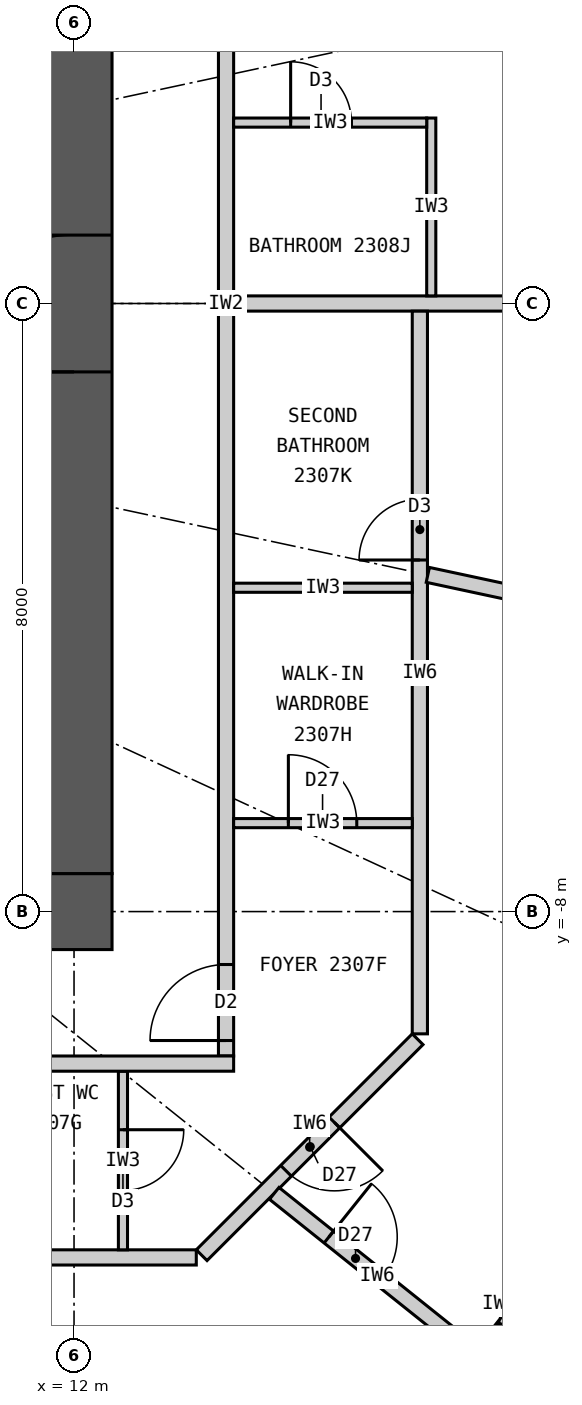
"""IFC4 building model, lengths in metres.
Left out: names, types, materials, properties, quantities, classifications, styles, units other than length and angle.
Written with IfcOpenShell. Run it as: python <this file> out.ifc"""

import sys

from ifc_helpers import new_model, si_unit, direction, frame, frame_2d, origin, place, context, subcontext, project, spatial, rectangle, extrude, element, fill, save


model = new_model("IFC4")
c1 = context("Model", 3, precision=1e-05, world=origin(), true_north=direction((0.0, 1.0)))
c2 = subcontext(c1, "Body", "Model", "MODEL_VIEW")
j1 = project(units=[si_unit("LENGTHUNIT", "METRE"), si_unit("PLANEANGLEUNIT", "RADIAN")], contexts=[c1])
p1 = place(None, origin())
s1 = spatial("IfcSite", under=j1, at=p1, CompositionType="ELEMENT")
p2 = place(p1, origin())
s2 = spatial("IfcBuilding", under=s1, at=p2, CompositionType="ELEMENT")
p3 = place(p2, frame((0.0, 0.0, 90.3)))
s3 = spatial("IfcBuildingStorey", under=s2, at=p3, CompositionType="ELEMENT", Elevation=90.3)
p4 = place(p3, frame((12.5, -8.0, 0.0), z_axis=(0.0, 0.0, 1.0), x_axis=(-1.0, 0.0, 0.0)))
e1 = element("IfcWall", 1, at=p4, inside=s3, PredefinedType="SHEAR", context=c2, shape_type="SweptSolid", body=[
    extrude(rectangle(XDim=25.0, YDim=1.0, at=frame_2d((12.5, 0.0))), origin(), (0.0, 0.0, 1.0), 3.3),
])
p5 = place(p4, frame((11.2, 0.0, 0.0)))
e2 = element("IfcOpeningElement", 2, at=p5, cuts=e1, PredefinedType="OPENING", context=c2, shape_type="SweptSolid", body=[
    extrude(rectangle(XDim=1.2, YDim=2.2, at=frame_2d((0.6, 1.1))), frame((0.0, 0.51, 0.0), z_axis=(0.0, -1.0, 0.0), x_axis=(1.0, 0.0, 0.0)), (0.0, 0.0, 1.0), 1.02),
])
p6 = place(p4, frame((18.8, 0.0, 0.0)))
e3 = element("IfcOpeningElement", 3, at=p6, cuts=e1, PredefinedType="OPENING", context=c2, shape_type="SweptSolid", body=[
    extrude(rectangle(XDim=0.9, YDim=2.2, at=frame_2d((0.45, 1.1))), frame((0.0, 0.51, 0.0), z_axis=(0.0, -1.0, 0.0), x_axis=(1.0, 0.0, 0.0)), (0.0, 0.0, 1.0), 1.02),
])
p7 = place(p3, frame((12.0, -7.5, 0.0), z_axis=(0.0, 0.0, 1.0), x_axis=(0.0, 1.0, 0.0)))
e4 = element("IfcWall", 4, at=p7, inside=s3, PredefinedType="SHEAR", context=c2, shape_type="SweptSolid", body=[
    extrude(rectangle(XDim=15.0, YDim=1.0, at=frame_2d((7.5, 0.0))), origin(), (0.0, 0.0, 1.0), 3.3),
])
p8 = place(p7, frame((6.6, 0.0, 0.0)))
e5 = element("IfcOpeningElement", 5, at=p8, cuts=e4, PredefinedType="OPENING", context=c2, shape_type="SweptSolid", body=[
    extrude(rectangle(XDim=1.8, YDim=2.2, at=frame_2d((0.9, 1.1))), frame((0.0, 0.51, 0.0), z_axis=(0.0, -1.0, 0.0), x_axis=(1.0, 0.0, 0.0)), (0.0, 0.0, 1.0), 1.02),
])
p9 = place(p3, frame((14.0, -9.9, 0.0), z_axis=(0.0, 0.0, 1.0), x_axis=(0.0, 1.0, 0.0)))
e6 = element("IfcWall", 6, at=p9, inside=s3, PredefinedType="PARTITIONING", context=c2, shape_type="SweptSolid", body=[
    extrude(rectangle(XDim=19.8, YDim=0.2, at=frame_2d((9.9, 0.0))), origin(), (0.0, 0.0, 1.0), 3.05),
])
p10 = place(p9, frame((0.204, 0.0, 0.0)))
e7 = element("IfcOpeningElement", 7, at=p10, cuts=e6, PredefinedType="OPENING", context=c2, shape_type="SweptSolid", body=[
    extrude(rectangle(XDim=1.0, YDim=2.2, at=frame_2d((0.5, 1.1))), frame((0.0, 0.11, 0.0), z_axis=(0.0, -1.0, 0.0), x_axis=(1.0, 0.0, 0.0)), (0.0, 0.0, 1.0), 0.22),
])
p11 = place(p9, frame((13.715, 0.0, 0.0)))
e8 = element("IfcOpeningElement", 8, at=p11, cuts=e6, PredefinedType="OPENING", context=c2, shape_type="SweptSolid", body=[
    extrude(rectangle(XDim=1.0, YDim=2.2, at=frame_2d((0.5, 1.1))), frame((0.0, 0.11, 0.0), z_axis=(0.0, -1.0, 0.0), x_axis=(1.0, 0.0, 0.0)), (0.0, 0.0, 1.0), 0.22),
])
p12 = place(p9, frame((18.698, 0.0, 0.0)))
e9 = element("IfcOpeningElement", 9, at=p12, cuts=e6, PredefinedType="OPENING", context=c2, shape_type="SweptSolid", body=[
    extrude(rectangle(XDim=1.0, YDim=2.2, at=frame_2d((0.5, 1.1))), frame((0.0, 0.11, 0.0), z_axis=(0.0, -1.0, 0.0), x_axis=(1.0, 0.0, 0.0)), (0.0, 0.0, 1.0), 0.22),
])
p13 = place(p3, frame((14.1, 0.0, 0.0), z_axis=(0.0, 0.0, 1.0), x_axis=(1.0, 0.0, 0.0)))
e10 = element("IfcWall", 10, at=p13, inside=s3, PredefinedType="PARTITIONING", context=c2, shape_type="SweptSolid", body=[
    extrude(rectangle(XDim=10.75, YDim=0.2, at=frame_2d((5.375, 0.0))), origin(), (0.0, 0.0, 1.0), 2.25),
])
p14 = place(p3, frame((7.289, -10.1, 0.0), z_axis=(0.0, 0.0, 1.0), x_axis=(0.585198353053, -0.810890182197, 0.0)))
e11 = element("IfcWall", 11, at=p14, inside=s3, PredefinedType="PARTITIONING", context=c2, shape_type="SweptSolid", body=[
    extrude(rectangle(XDim=8.36, YDim=0.2, at=frame_2d((4.18, 0.0))), origin(), (0.0, 0.0, 1.0), 2.15),
])
p15 = place(p3, frame((9.232, -12.55, 0.0), z_axis=(0.0, 0.0, 1.0), x_axis=(1.0, 0.0, 0.0)))
e12 = element("IfcWall", 12, at=p15, inside=s3, PredefinedType="PARTITIONING", context=c2, shape_type="SweptSolid", body=[
    extrude(rectangle(XDim=4.377, YDim=0.2, at=frame_2d((2.188, 0.0))), origin(), (0.0, 0.0, 1.0), 3.05),
])
p16 = place(p15, frame((0.685, 0.0, 0.0)))
e13 = element("IfcOpeningElement", 13, at=p16, cuts=e12, PredefinedType="OPENING", context=c2, shape_type="SweptSolid", body=[
    extrude(rectangle(XDim=0.8, YDim=2.1, at=frame_2d((0.4, 1.05))), frame((0.0, 0.11, 0.0), z_axis=(0.0, -1.0, 0.0), x_axis=(1.0, 0.0, 0.0)), (0.0, 0.0, 1.0), 0.22),
])
p17 = place(p3, frame((13.679, -12.521, 0.0), z_axis=(0.0, 0.0, 1.0), x_axis=(0.707106781187, 0.707106781187, 0.0)))
e14 = element("IfcWall", 14, at=p17, inside=s3, PredefinedType="PARTITIONING", context=c2, shape_type="SweptSolid", body=[
    extrude(rectangle(XDim=4.019, YDim=0.2, at=frame_2d((2.009, 0.0))), origin(), (0.0, 0.0, 1.0), 3.05),
])
p18 = place(p17, frame((1.57, 0.0, 0.0)))
e15 = element("IfcOpeningElement", 15, at=p18, cuts=e14, PredefinedType="OPENING", context=c2, shape_type="SweptSolid", body=[
    extrude(rectangle(XDim=0.9, YDim=2.1, at=frame_2d((0.45, 1.05))), frame((0.0, 0.11, 0.0), z_axis=(0.0, -1.0, 0.0), x_axis=(1.0, 0.0, 0.0)), (0.0, 0.0, 1.0), 0.22),
])
p19 = place(p3, frame((16.55, -9.609, 0.0), z_axis=(0.0, 0.0, 1.0), x_axis=(0.0, 1.0, 0.0)))
e16 = element("IfcWall", 16, at=p19, inside=s3, PredefinedType="PARTITIONING", context=c2, shape_type="SweptSolid", body=[
    extrude(rectangle(XDim=9.508, YDim=0.2, at=frame_2d((4.754, 0.0))), origin(), (0.0, 0.0, 1.0), 3.05),
])
p20 = place(p19, frame((6.234, 0.0, 0.0)))
e17 = element("IfcOpeningElement", 17, at=p20, cuts=e16, PredefinedType="OPENING", context=c2, shape_type="SweptSolid", body=[
    extrude(rectangle(XDim=0.8, YDim=2.1, at=frame_2d((0.4, 1.05))), frame((0.0, 0.11, 0.0), z_axis=(0.0, -1.0, 0.0), x_axis=(1.0, 0.0, 0.0)), (0.0, 0.0, 1.0), 0.22),
])
p21 = place(p3, frame((14.634, -11.707, 0.0), z_axis=(0.0, 0.0, 1.0), x_axis=(0.780903110683, -0.624652168591, 0.0)))
e18 = element("IfcWall", 18, at=p21, inside=s3, PredefinedType="PARTITIONING", context=c2, shape_type="SweptSolid", body=[
    extrude(rectangle(XDim=3.472, YDim=0.2, at=frame_2d((1.736, 0.0))), origin(), (0.0, 0.0, 1.0), 2.25),
])
p22 = place(p21, frame((0.92, 0.0, 0.0)))
e19 = element("IfcOpeningElement", 19, at=p22, cuts=e18, PredefinedType="OPENING", context=c2, shape_type="SweptSolid", body=[
    extrude(rectangle(XDim=0.9, YDim=2.1, at=frame_2d((0.45, 1.05))), frame((0.0, 0.11, 0.0), z_axis=(0.0, -1.0, 0.0), x_axis=(1.0, 0.0, 0.0)), (0.0, 0.0, 1.0), 0.22),
])
p23 = place(p3, frame((16.655, -3.57, 0.0), z_axis=(0.0, 0.0, 1.0), x_axis=(0.977788045219, -0.209596132183, 0.0)))
e20 = element("IfcWall", 20, at=p23, inside=s3, PredefinedType="PARTITIONING", context=c2, shape_type="SweptSolid", body=[
    extrude(rectangle(XDim=3.482, YDim=0.2, at=frame_2d((1.741, 0.0))), origin(), (0.0, 0.0, 1.0), 3.05),
])
p24 = place(p23, frame((1.621, 0.0, 0.0)))
e21 = element("IfcOpeningElement", 21, at=p24, cuts=e20, PredefinedType="OPENING", context=c2, shape_type="SweptSolid", body=[
    extrude(rectangle(XDim=0.9, YDim=2.1, at=frame_2d((0.45, 1.05))), frame((0.0, 0.11, 0.0), z_axis=(0.0, -1.0, 0.0), x_axis=(1.0, 0.0, 0.0)), (0.0, 0.0, 1.0), 0.22),
])
p25 = place(p3, frame((12.644, -10.1, 0.0), z_axis=(0.0, 0.0, 1.0), x_axis=(0.0, -1.0, 0.0)))
e22 = element("IfcWall", 22, at=p25, inside=s3, PredefinedType="PARTITIONING", context=c2, shape_type="SweptSolid", body=[
    extrude(rectangle(XDim=2.35, YDim=0.12, at=frame_2d((1.175, 0.0))), origin(), (0.0, 0.0, 1.0), 3.05),
])
p26 = place(p25, frame((0.77, 0.0, 0.0)))
e23 = element("IfcOpeningElement", 23, at=p26, cuts=e22, PredefinedType="OPENING", context=c2, shape_type="SweptSolid", body=[
    extrude(rectangle(XDim=0.8, YDim=2.1, at=frame_2d((0.4, 1.05))), frame((0.0, 0.07, 0.0), z_axis=(0.0, -1.0, 0.0), x_axis=(1.0, 0.0, 0.0)), (0.0, 0.0, 1.0), 0.14),
])
p27 = place(p3, frame((14.1, -6.836, 0.0), z_axis=(0.0, 0.0, 1.0), x_axis=(1.0, 0.0, 0.0)))
e24 = element("IfcWall", 24, at=p27, inside=s3, PredefinedType="PARTITIONING", context=c2, shape_type="SweptSolid", body=[
    extrude(rectangle(XDim=2.35, YDim=0.12, at=frame_2d((1.175, 0.0))), origin(), (0.0, 0.0, 1.0), 3.05),
])
p28 = place(p27, frame((0.72, 0.0, 0.0)))
e25 = element("IfcOpeningElement", 25, at=p28, cuts=e24, PredefinedType="OPENING", context=c2, shape_type="SweptSolid", body=[
    extrude(rectangle(XDim=0.9, YDim=2.1, at=frame_2d((0.45, 1.05))), frame((0.0, 0.07, 0.0), z_axis=(0.0, -1.0, 0.0), x_axis=(1.0, 0.0, 0.0)), (0.0, 0.0, 1.0), 0.14),
])
p29 = place(p3, frame((14.1, -3.74, 0.0), z_axis=(0.0, 0.0, 1.0), x_axis=(1.0, 0.0, 0.0)))
e26 = element("IfcWall", 26, at=p29, inside=s3, PredefinedType="PARTITIONING", context=c2, shape_type="SweptSolid", body=[
    extrude(rectangle(XDim=2.35, YDim=0.12, at=frame_2d((1.175, 0.0))), origin(), (0.0, 0.0, 1.0), 2.05),
])
p30 = place(p3, frame((16.7, 0.1, 0.0), z_axis=(0.0, 0.0, 1.0), x_axis=(0.0, 1.0, 0.0)))
e27 = element("IfcWall", 27, at=p30, inside=s3, PredefinedType="PARTITIONING", context=c2, shape_type="SweptSolid", body=[
    extrude(rectangle(XDim=2.34, YDim=0.12, at=frame_2d((1.17, 0.0))), origin(), (0.0, 0.0, 1.0), 3.05),
])
p31 = place(p3, frame((14.1, 2.38, 0.0), z_axis=(0.0, 0.0, 1.0), x_axis=(1.0, 0.0, 0.0)))
e28 = element("IfcWall", 28, at=p31, inside=s3, PredefinedType="PARTITIONING", context=c2, shape_type="SweptSolid", body=[
    extrude(rectangle(XDim=2.54, YDim=0.12, at=frame_2d((1.27, 0.0))), origin(), (0.0, 0.0, 1.0), 3.05),
])
p32 = place(p31, frame((0.75, 0.0, 0.0)))
e29 = element("IfcOpeningElement", 29, at=p32, cuts=e28, PredefinedType="OPENING", context=c2, shape_type="SweptSolid", body=[
    extrude(rectangle(XDim=0.8, YDim=2.1, at=frame_2d((0.4, 1.05))), frame((0.0, 0.07, 0.0), z_axis=(0.0, -1.0, 0.0), x_axis=(1.0, 0.0, 0.0)), (0.0, 0.0, 1.0), 0.14),
])
p33 = place(p3, frame((14.1, -10.0, 0.0), z_axis=(0.0, 0.0, 1.0), x_axis=(-1.0, 0.0, 0.0)))
e30 = element("IfcWall", 30, at=p33, inside=s3, PredefinedType="PARTITIONING", context=c2, shape_type="SweptSolid", body=[
    extrude(rectangle(XDim=24.429, YDim=0.2, at=frame_2d((12.215, 0.0))), origin(), (0.0, 0.0, 1.0), 3.05),
])
p34 = place(p33, frame((13.597, 0.0, 0.0)))
e31 = element("IfcOpeningElement", 31, at=p34, cuts=e30, PredefinedType="OPENING", context=c2, shape_type="SweptSolid", body=[
    extrude(rectangle(XDim=1.0, YDim=2.2, at=frame_2d((0.5, 1.1))), frame((0.0, 0.11, 0.0), z_axis=(0.0, -1.0, 0.0), x_axis=(1.0, 0.0, 0.0)), (0.0, 0.0, 1.0), 0.22),
])
p35 = place(p3, frame((17.361, -13.76, 0.0), z_axis=(0.0, 0.0, 1.0), x_axis=(0.624501042889, 0.781023973659, 0.0)))
e32 = element("IfcWall", 32, at=p35, inside=s3, PredefinedType="PARTITIONING", context=c2, shape_type="SweptSolid", body=[
    extrude(rectangle(XDim=0.767, YDim=0.12, at=frame_2d((0.384, 0.0))), origin(), (0.0, 0.0, 1.0), 3.05),
])
p36 = place(p10, origin())
e33 = element("IfcDoor", 33, at=p36, inside=s3, OperationType="SINGLE_SWING_LEFT", PredefinedType="DOOR", context=c2, shape_type="SweptSolid", body=[
    extrude(rectangle(XDim=1.0, YDim=2.2, at=frame_2d((0.5, 1.1))), frame((0.0, 0.025, 0.0), z_axis=(0.0, -1.0, 0.0), x_axis=(1.0, 0.0, 0.0)), (0.0, 0.0, 1.0), 0.05),
])
fill(e7, e33)
p37 = place(p26, origin())
e34 = element("IfcDoor", 34, at=p37, inside=s3, OperationType="SINGLE_SWING_LEFT", PredefinedType="DOOR", context=c2, shape_type="SweptSolid", body=[
    extrude(rectangle(XDim=0.8, YDim=2.1, at=frame_2d((0.4, 1.05))), frame((0.0, 0.025, 0.0), z_axis=(0.0, -1.0, 0.0), x_axis=(1.0, 0.0, 0.0)), (0.0, 0.0, 1.0), 0.05),
])
fill(e23, e34)
p38 = place(p28, origin())
e35 = element("IfcDoor", 35, at=p38, inside=s3, OperationType="SINGLE_SWING_LEFT", PredefinedType="DOOR", context=c2, shape_type="SweptSolid", body=[
    extrude(rectangle(XDim=0.9, YDim=2.1, at=frame_2d((0.45, 1.05))), frame((0.0, 0.025, 0.0), z_axis=(0.0, -1.0, 0.0), x_axis=(1.0, 0.0, 0.0)), (0.0, 0.0, 1.0), 0.05),
])
fill(e25, e35)
p39 = place(p20, origin())
e36 = element("IfcDoor", 36, at=p39, inside=s3, OperationType="SINGLE_SWING_LEFT", PredefinedType="DOOR", context=c2, shape_type="SweptSolid", body=[
    extrude(rectangle(XDim=0.8, YDim=2.1, at=frame_2d((0.4, 1.05))), frame((0.0, 0.025, 0.0), z_axis=(0.0, -1.0, 0.0), x_axis=(1.0, 0.0, 0.0)), (0.0, 0.0, 1.0), 0.05),
])
fill(e17, e36)
p40 = place(p18, origin())
e37 = element("IfcDoor", 37, at=p40, inside=s3, OperationType="SINGLE_SWING_RIGHT", PredefinedType="DOOR", context=c2, shape_type="SweptSolid", body=[
    extrude(rectangle(XDim=0.9, YDim=2.1, at=frame_2d((0.45, 1.05))), frame((0.0, 0.025, 0.0), z_axis=(0.0, -1.0, 0.0), x_axis=(1.0, 0.0, 0.0)), (0.0, 0.0, 1.0), 0.05),
])
fill(e15, e37)
p41 = place(p22, origin())
e38 = element("IfcDoor", 38, at=p41, inside=s3, OperationType="SINGLE_SWING_LEFT", PredefinedType="DOOR", context=c2, shape_type="SweptSolid", body=[
    extrude(rectangle(XDim=0.9, YDim=2.1, at=frame_2d((0.45, 1.05))), frame((0.0, 0.025, 0.0), z_axis=(0.0, -1.0, 0.0), x_axis=(1.0, 0.0, 0.0)), (0.0, 0.0, 1.0), 0.05),
])
fill(e19, e38)
p42 = place(p32, origin())
e39 = element("IfcDoor", 39, at=p42, inside=s3, OperationType="SINGLE_SWING_LEFT", PredefinedType="DOOR", context=c2, shape_type="SweptSolid", body=[
    extrude(rectangle(XDim=0.8, YDim=2.1, at=frame_2d((0.4, 1.05))), frame((0.0, 0.025, 0.0), z_axis=(0.0, -1.0, 0.0), x_axis=(1.0, 0.0, 0.0)), (0.0, 0.0, 1.0), 0.05),
])
fill(e29, e39)
p43 = place(p8, origin())
e40 = element("IfcDoor", 40, at=p43, inside=s3, OperationType="DOUBLE_DOOR_DOUBLE_SWING", PredefinedType="DOOR", context=c2, shape_type="SweptSolid", body=[
    extrude(rectangle(XDim=1.8, YDim=2.2, at=frame_2d((0.9, 1.1))), frame((0.0, 0.025, 0.0), z_axis=(0.0, -1.0, 0.0), x_axis=(1.0, 0.0, 0.0)), (0.0, 0.0, 1.0), 0.05),
])
fill(e5, e40)
save(model, sys.argv[1])
